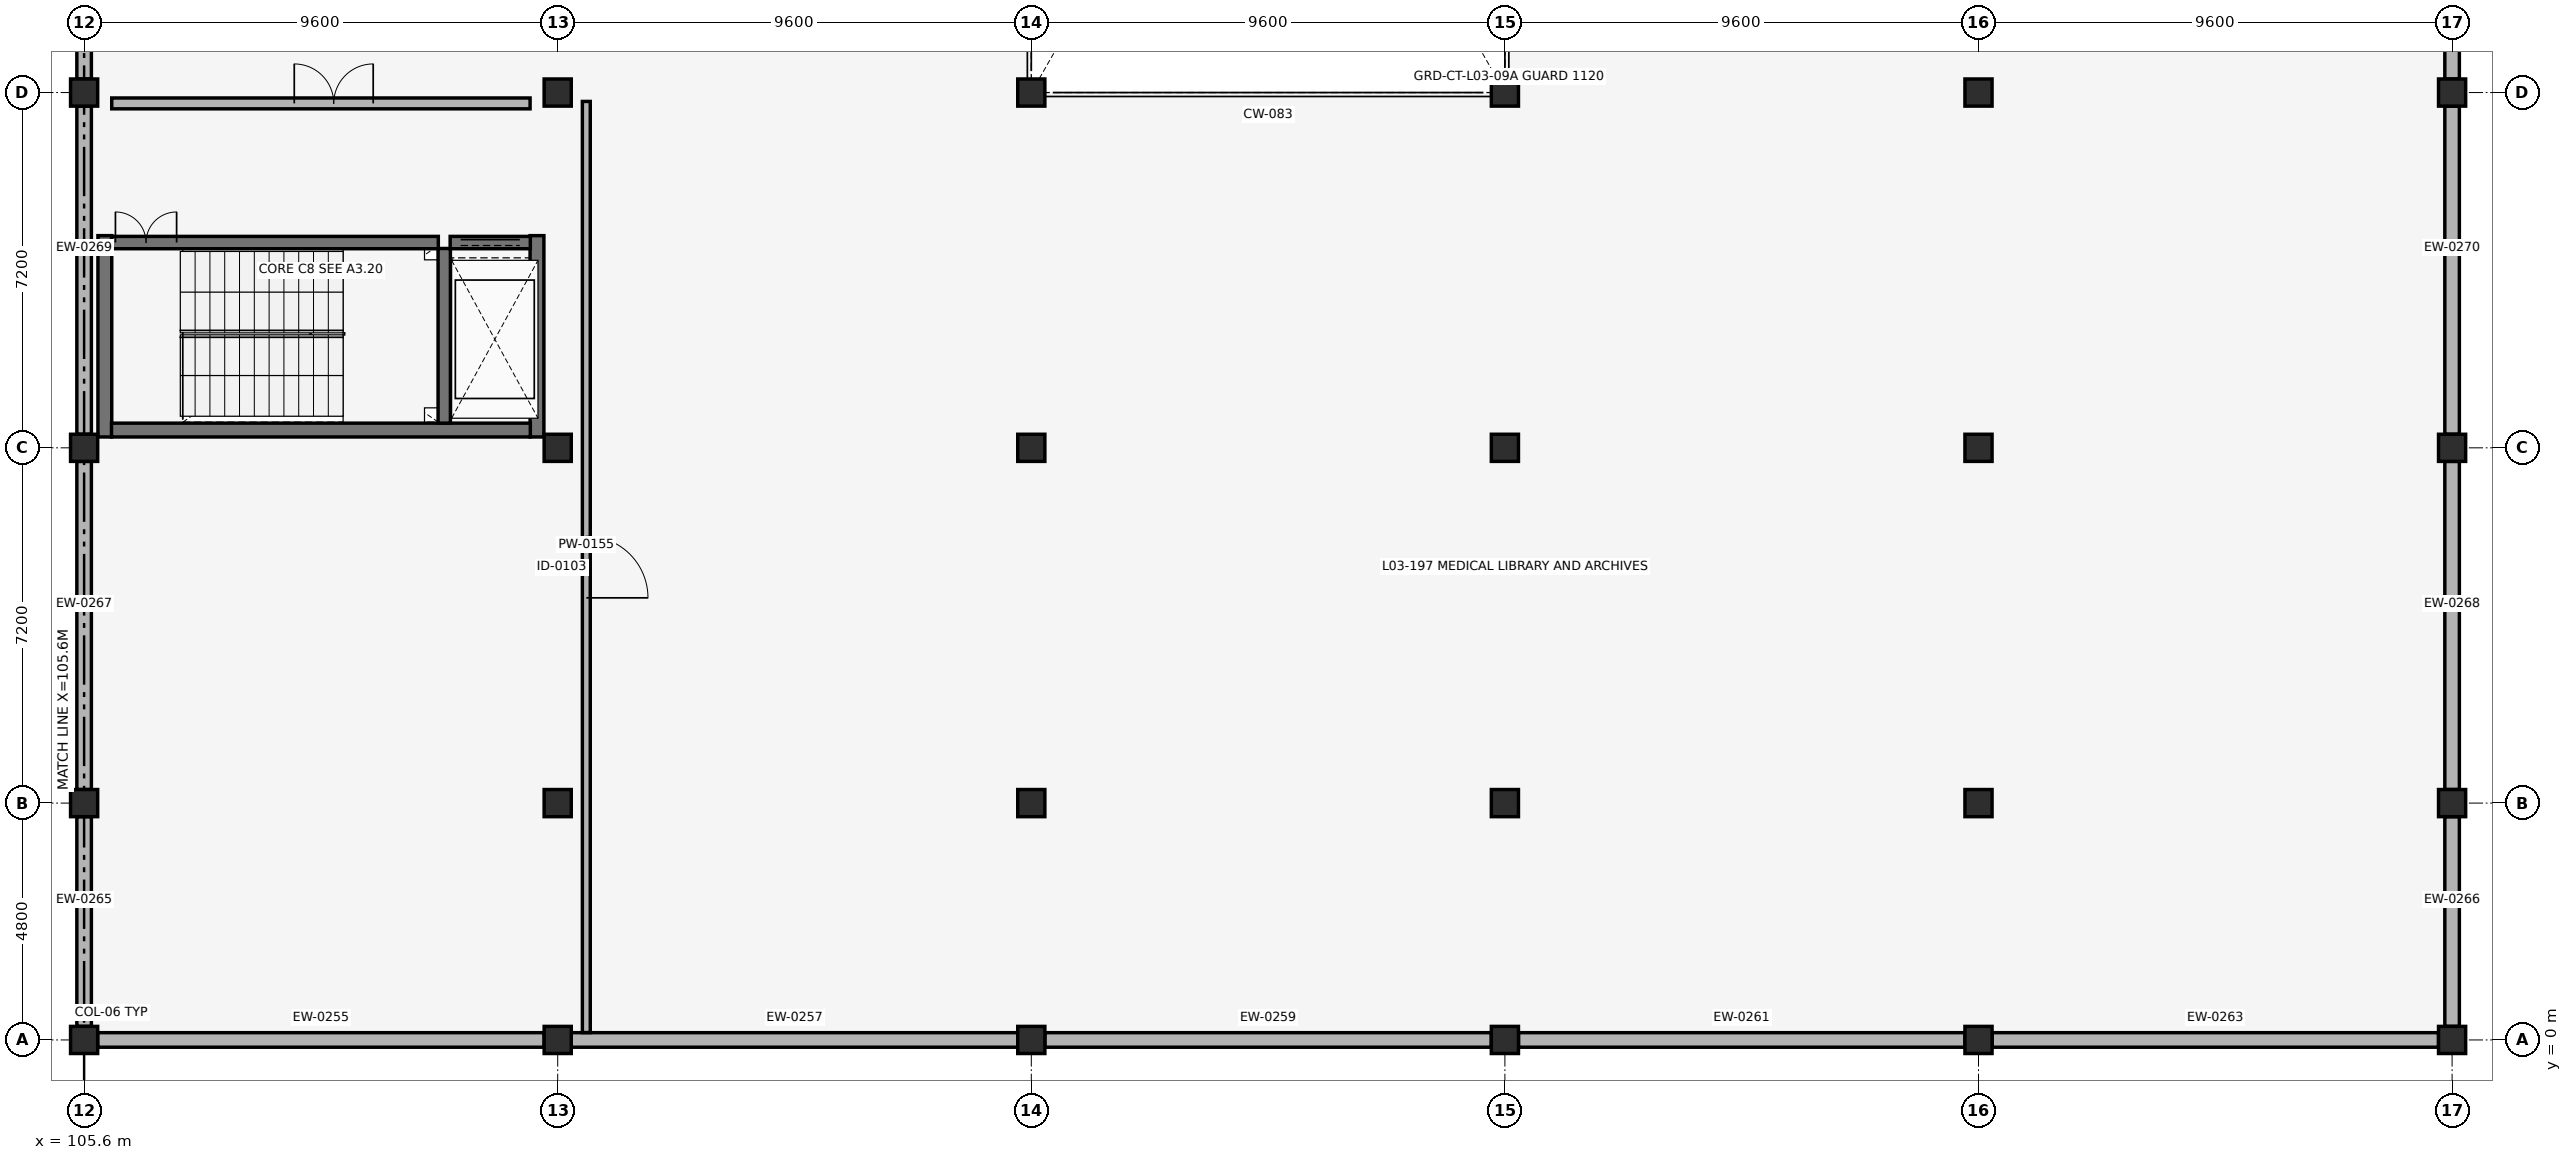
"""IFC4 building model, lengths in metres.
Left out: names, types, materials, properties, quantities, classifications, styles, units other than length and angle.
Written with IfcOpenShell. Run it as: python <this file> out.ifc"""

import sys

from ifc_helpers import new_model, si_unit, direction, frame, frame_2d, origin, origin_2d, place, context, subcontext, project, spatial, rectangle, extrude, element, fill, save


model = new_model("IFC4")
c1 = context("Model", 3, precision=1e-05, world=origin(), true_north=direction((0.0, 1.0)))
c2 = subcontext(c1, "Body", "Model", "MODEL_VIEW")
j1 = project(units=[si_unit("LENGTHUNIT", "METRE"), si_unit("PLANEANGLEUNIT", "RADIAN")], contexts=[c1])
p1 = place(None, origin())
s1 = spatial("IfcSite", under=j1, at=p1, CompositionType="ELEMENT")
p2 = place(p1, origin())
s2 = spatial("IfcBuilding", under=s1, at=p2, CompositionType="ELEMENT")
p3 = place(p2, frame((0.0, 0.0, 12.58)))
s3 = spatial("IfcBuildingStorey", under=s2, at=p3, CompositionType="ELEMENT", Elevation=12.58)
for number, where, z_axis, x_axis in (
    (1, (105.6, 0.0, 0.0), (0.0, 0.0, 1.0), (1.0, 0.0, 0.0)),
    (2, (105.6, 4.8, 0.0), (0.0, 0.0, 1.0), (1.0, 0.0, 0.0)),
    (3, (105.6, 12.0, 0.0), (0.0, 0.0, 1.0), (1.0, 0.0, 0.0)),
    (4, (105.6, 19.2, 0.0), (0.0, 0.0, 1.0), (1.0, 0.0, 0.0)),
    (5, (115.2, 0.0, 0.0), (0.0, 0.0, 1.0), (1.0, 0.0, 0.0)),
    (6, (115.2, 4.8, 0.0), (0.0, 0.0, 1.0), (1.0, 0.0, 0.0)),
    (7, (115.2, 12.0, 0.0), (0.0, 0.0, 1.0), (1.0, 0.0, 0.0)),
    (8, (115.2, 19.2, 0.0), (0.0, 0.0, 1.0), (1.0, 0.0, 0.0)),
    (9, (124.8, 0.0, 0.0), (0.0, 0.0, 1.0), (1.0, 0.0, 0.0)),
    (10, (124.8, 4.8, 0.0), (0.0, 0.0, 1.0), (1.0, 0.0, 0.0)),
    (11, (124.8, 12.0, 0.0), (0.0, 0.0, 1.0), (1.0, 0.0, 0.0)),
    (12, (124.8, 19.2, 0.0), (0.0, 0.0, 1.0), (1.0, 0.0, 0.0)),
    (13, (134.4, 0.0, 0.0), (0.0, 0.0, 1.0), (1.0, 0.0, 0.0)),
    (14, (134.4, 4.8, 0.0), (0.0, 0.0, 1.0), (1.0, 0.0, 0.0)),
    (15, (134.4, 12.0, 0.0), (0.0, 0.0, 1.0), (1.0, 0.0, 0.0)),
    (16, (134.4, 19.2, 0.0), (0.0, 0.0, 1.0), (1.0, 0.0, 0.0)),
    (17, (144.0, 0.0, 0.0), (0.0, 0.0, 1.0), (1.0, 0.0, 0.0)),
    (18, (144.0, 4.8, 0.0), (0.0, 0.0, 1.0), (1.0, 0.0, 0.0)),
    (19, (144.0, 12.0, 0.0), (0.0, 0.0, 1.0), (1.0, 0.0, 0.0)),
    (20, (144.0, 19.2, 0.0), (0.0, 0.0, 1.0), (1.0, 0.0, 0.0)),
    (21, (153.6, 0.0, 0.0), (0.0, 0.0, 1.0), (1.0, 0.0, 0.0)),
    (22, (153.6, 4.8, 0.0), (0.0, 0.0, 1.0), (1.0, 0.0, 0.0)),
    (23, (153.6, 12.0, 0.0), (0.0, 0.0, 1.0), (1.0, 0.0, 0.0)),
    (24, (153.6, 19.2, 0.0), (0.0, 0.0, 1.0), (1.0, 0.0, 0.0)),
):
    element("IfcColumn", number, at=place(p3, frame(where, z_axis=z_axis, x_axis=x_axis)), inside=s3, PredefinedType="COLUMN", context=c2, shape_type="SweptSolid", body=[
        extrude(rectangle(XDim=0.55, YDim=0.55, at=origin_2d()), origin(), (0.0, 0.0, 1.0), 4.08),
    ])
p4 = place(p3, frame((105.875, 0.0, 0.0), z_axis=(0.0, 0.0, 1.0), x_axis=(1.0, 0.0, 0.0)))
e25 = element("IfcWall", 25, at=p4, inside=s3, PredefinedType="SOLIDWALL", context=c2, shape_type="SweptSolid", body=[
    extrude(rectangle(XDim=9.05, YDim=0.295, at=frame_2d((4.525, 0.0))), origin(), (0.0, 0.0, 1.0), 3.06),
])
p5 = place(p3, frame((115.475, 0.0, 0.0), z_axis=(0.0, 0.0, 1.0), x_axis=(1.0, 0.0, 0.0)))
e26 = element("IfcWall", 26, at=p5, inside=s3, PredefinedType="SOLIDWALL", context=c2, shape_type="SweptSolid", body=[
    extrude(rectangle(XDim=9.05, YDim=0.295, at=frame_2d((4.525, 0.0))), origin(), (0.0, 0.0, 1.0), 3.06),
])
for number, where, z_axis, x_axis in (
    (27, (125.075, 0.0, 0.0), (0.0, 0.0, 1.0), (1.0, 0.0, 0.0)),
    (28, (134.675, 0.0, 0.0), (0.0, 0.0, 1.0), (1.0, 0.0, 0.0)),
    (29, (144.275, 0.0, 0.0), (0.0, 0.0, 1.0), (1.0, 0.0, 0.0)),
):
    element("IfcWall", number, at=place(p3, frame(where, z_axis=z_axis, x_axis=x_axis)), inside=s3, PredefinedType="SOLIDWALL", context=c2, shape_type="SweptSolid", body=[
        extrude(rectangle(XDim=9.05, YDim=0.295, at=frame_2d((4.525, 0.0))), origin(), (0.0, 0.0, 1.0), 3.06),
    ])
for number, where, z_axis, x_axis in (
    (30, (105.6, 4.525, 0.0), (0.0, 0.0, 1.0), (0.0, -1.0, 0.0)),
    (31, (153.6, 0.275, 0.0), (0.0, 0.0, 1.0), (0.0, 1.0, 0.0)),
):
    element("IfcWall", number, at=place(p3, frame(where, z_axis=z_axis, x_axis=x_axis)), inside=s3, PredefinedType="SOLIDWALL", context=c2, shape_type="SweptSolid", body=[
        extrude(rectangle(XDim=4.25, YDim=0.295, at=frame_2d((2.125, 0.0))), origin(), (0.0, 0.0, 1.0), 3.06),
    ])
for number, where, z_axis, x_axis in (
    (32, (105.6, 11.725, 0.0), (0.0, 0.0, 1.0), (0.0, -1.0, 0.0)),
    (33, (153.6, 5.075, 0.0), (0.0, 0.0, 1.0), (0.0, 1.0, 0.0)),
    (34, (105.6, 18.925, 0.0), (0.0, 0.0, 1.0), (0.0, -1.0, 0.0)),
    (35, (153.6, 12.275, 0.0), (0.0, 0.0, 1.0), (0.0, 1.0, 0.0)),
):
    element("IfcWall", number, at=place(p3, frame(where, z_axis=z_axis, x_axis=x_axis)), inside=s3, PredefinedType="SOLIDWALL", context=c2, shape_type="SweptSolid", body=[
        extrude(rectangle(XDim=6.65, YDim=0.295, at=frame_2d((3.325, 0.0))), origin(), (0.0, 0.0, 1.0), 3.06),
    ])
for number, where, z_axis, x_axis in (
    (36, (105.6, 26.125, 0.0), (0.0, 0.0, 1.0), (0.0, -1.0, 0.0)),
    (37, (153.6, 19.475, 0.0), (0.0, 0.0, 1.0), (0.0, 1.0, 0.0)),
):
    element("IfcWall", number, at=place(p3, frame(where, z_axis=z_axis, x_axis=x_axis)), inside=s3, PredefinedType="SOLIDWALL", context=c2, shape_type="SweptSolid", body=[
        extrude(rectangle(XDim=6.65, YDim=0.295, at=frame_2d((3.325, 0.0))), origin(), (0.0, 0.0, 1.0), 3.06),
    ])
for number, where, z_axis, x_axis in (
    (38, (106.02, 12.22, 0.0), (0.0, 0.0, 1.0), (0.0, 1.0, 0.0)),
    (39, (114.78, 12.22, 0.0), (0.0, 0.0, 1.0), (0.0, 1.0, 0.0)),
):
    element("IfcWall", number, at=place(p3, frame(where, z_axis=z_axis, x_axis=x_axis)), inside=s3, PredefinedType="SHEAR", context=c2, shape_type="SweptSolid", body=[
        extrude(rectangle(XDim=4.08, YDim=0.28, at=frame_2d((2.04, 0.0))), origin(), (0.0, 0.0, 1.0), 3.78),
    ])
p6 = place(p3, frame((106.155, 12.36, 0.0), z_axis=(0.0, 0.0, 1.0), x_axis=(1.0, 0.0, 0.0)))
e40 = element("IfcWall", 40, at=p6, inside=s3, PredefinedType="SHEAR", context=c2, shape_type="SweptSolid", body=[
    extrude(rectangle(XDim=8.49, YDim=0.28, at=frame_2d((4.245, 0.0))), origin(), (0.0, 0.0, 1.0), 3.78),
])
p7 = place(p3, frame((112.9, 12.5, 0.0), z_axis=(0.0, 0.0, 1.0), x_axis=(0.0, 1.0, 0.0)))
e41 = element("IfcWall", 41, at=p7, inside=s3, PredefinedType="SHEAR", context=c2, shape_type="SweptSolid", body=[
    extrude(rectangle(XDim=3.54, YDim=0.25, at=frame_2d((1.77, 0.0))), origin(), (0.0, 0.0, 1.0), 3.78),
])
p8 = place(p3, frame((106.155, 16.16, 0.0), z_axis=(0.0, 0.0, 1.0), x_axis=(1.0, 0.0, 0.0)))
e42 = element("IfcWall", 42, at=p8, inside=s3, PredefinedType="SHEAR", context=c2, shape_type="SweptSolid", body=[
    extrude(rectangle(XDim=6.625, YDim=0.25, at=frame_2d((3.312, 0.0))), origin(), (0.0, 0.0, 1.0), 3.78),
])
p9 = place(p8, frame((0.08, 0.0, 0.0)))
e43 = element("IfcOpeningElement", 43, at=p9, cuts=e42, PredefinedType="OPENING", context=c2, shape_type="SweptSolid", body=[
    extrude(rectangle(XDim=1.24, YDim=2.15, at=frame_2d((0.62, 1.075))), frame((0.0, 0.135, 0.0), z_axis=(0.0, -1.0, 0.0), x_axis=(1.0, 0.0, 0.0)), (0.0, 0.0, 1.0), 0.27),
])
p10 = place(p3, frame((106.16, 18.98, 0.0), z_axis=(0.0, 0.0, 1.0), x_axis=(1.0, 0.0, 0.0)))
e44 = element("IfcWall", 44, at=p10, inside=s3, PredefinedType="PARTITIONING", context=c2, shape_type="SweptSolid", body=[
    extrude(rectangle(XDim=8.48, YDim=0.22, at=frame_2d((4.24, 0.0))), origin(), (0.0, 0.0, 1.0), 3.06),
])
p11 = place(p10, frame((3.7, 0.0, 0.0)))
e45 = element("IfcOpeningElement", 45, at=p11, cuts=e44, PredefinedType="OPENING", context=c2, shape_type="SweptSolid", body=[
    extrude(rectangle(XDim=1.6, YDim=2.2, at=frame_2d((0.8, 1.1))), frame((0.0, 0.12, 0.0), z_axis=(0.0, -1.0, 0.0), x_axis=(1.0, 0.0, 0.0)), (0.0, 0.0, 1.0), 0.24),
])
p12 = place(p3, frame((113.02, 16.16, 0.0), z_axis=(0.0, 0.0, 1.0), x_axis=(1.0, 0.0, 0.0)))
e46 = element("IfcWall", 46, at=p12, inside=s3, PredefinedType="SHEAR", context=c2, shape_type="SweptSolid", body=[
    extrude(rectangle(XDim=1.625, YDim=0.25, at=frame_2d((0.812, 0.0))), origin(), (0.0, 0.0, 1.0), 3.78),
])
p13 = place(p12, frame((0.212, 0.0, 0.0)))
e47 = element("IfcOpeningElement", 47, at=p13, cuts=e46, PredefinedType="OPENING", context=c2, shape_type="SweptSolid", body=[
    extrude(rectangle(XDim=1.2, YDim=2.15, at=frame_2d((0.6, 1.075))), frame((0.0, 0.135, 0.0), z_axis=(0.0, -1.0, 0.0), x_axis=(1.0, 0.0, 0.0)), (0.0, 0.0, 1.0), 0.27),
])
p14 = place(p3, frame((115.78, 0.149, 0.0), z_axis=(0.0, 0.0, 1.0), x_axis=(0.0, 1.0, 0.0)))
e48 = element("IfcWall", 48, at=p14, inside=s3, PredefinedType="PARTITIONING", context=c2, shape_type="SweptSolid", body=[
    extrude(rectangle(XDim=18.871, YDim=0.16, at=frame_2d((9.435, 0.0))), origin(), (0.0, 0.0, 1.0), 3.06),
])
p15 = place(p14, frame((8.81, 0.0, 0.0)))
e49 = element("IfcOpeningElement", 49, at=p15, cuts=e48, PredefinedType="OPENING", context=c2, shape_type="SweptSolid", body=[
    extrude(rectangle(XDim=1.25, YDim=2.12, at=frame_2d((0.625, 1.06))), frame((0.0, 0.09, 0.0), z_axis=(0.0, -1.0, 0.0), x_axis=(1.0, 0.0, 0.0)), (0.0, 0.0, 1.0), 0.18),
])
p16 = place(p9, origin())
e50 = element("IfcDoor", 50, at=p16, inside=s3, OperationType="DOUBLE_DOOR_SINGLE_SWING", PredefinedType="DOOR", context=c2, shape_type="SweptSolid", body=[
    extrude(rectangle(XDim=1.24, YDim=2.15, at=frame_2d((0.62, 1.075))), frame((0.0, 0.025, 0.0), z_axis=(0.0, -1.0, 0.0), x_axis=(1.0, 0.0, 0.0)), (0.0, 0.0, 1.0), 0.05),
])
fill(e43, e50)
p17 = place(p11, origin())
e51 = element("IfcDoor", 51, at=p17, inside=s3, OperationType="DOUBLE_DOOR_SINGLE_SWING", PredefinedType="DOOR", context=c2, shape_type="SweptSolid", body=[
    extrude(rectangle(XDim=1.6, YDim=2.2, at=frame_2d((0.8, 1.1))), frame((0.0, 0.025, 0.0), z_axis=(0.0, -1.0, 0.0), x_axis=(1.0, 0.0, 0.0)), (0.0, 0.0, 1.0), 0.05),
])
fill(e45, e51)
p18 = place(p13, origin())
e52 = element("IfcDoor", 52, at=p18, inside=s3, OperationType="DOUBLE_DOOR_SLIDING", PredefinedType="DOOR", context=c2, shape_type="SweptSolid", body=[
    extrude(rectangle(XDim=1.2, YDim=2.15, at=frame_2d((0.6, 1.075))), frame((0.0, 0.025, 0.0), z_axis=(0.0, -1.0, 0.0), x_axis=(1.0, 0.0, 0.0)), (0.0, 0.0, 1.0), 0.05),
])
fill(e47, e52)
p19 = place(p15, origin())
e53 = element("IfcDoor", 53, at=p19, inside=s3, OperationType="SINGLE_SWING_RIGHT", PredefinedType="DOOR", context=c2, shape_type="SweptSolid", body=[
    extrude(rectangle(XDim=1.25, YDim=2.12, at=frame_2d((0.625, 1.06))), frame((0.0, 0.025, 0.0), z_axis=(0.0, -1.0, 0.0), x_axis=(1.0, 0.0, 0.0)), (0.0, 0.0, 1.0), 0.05),
])
fill(e49, e53)
save(model, sys.argv[1])
